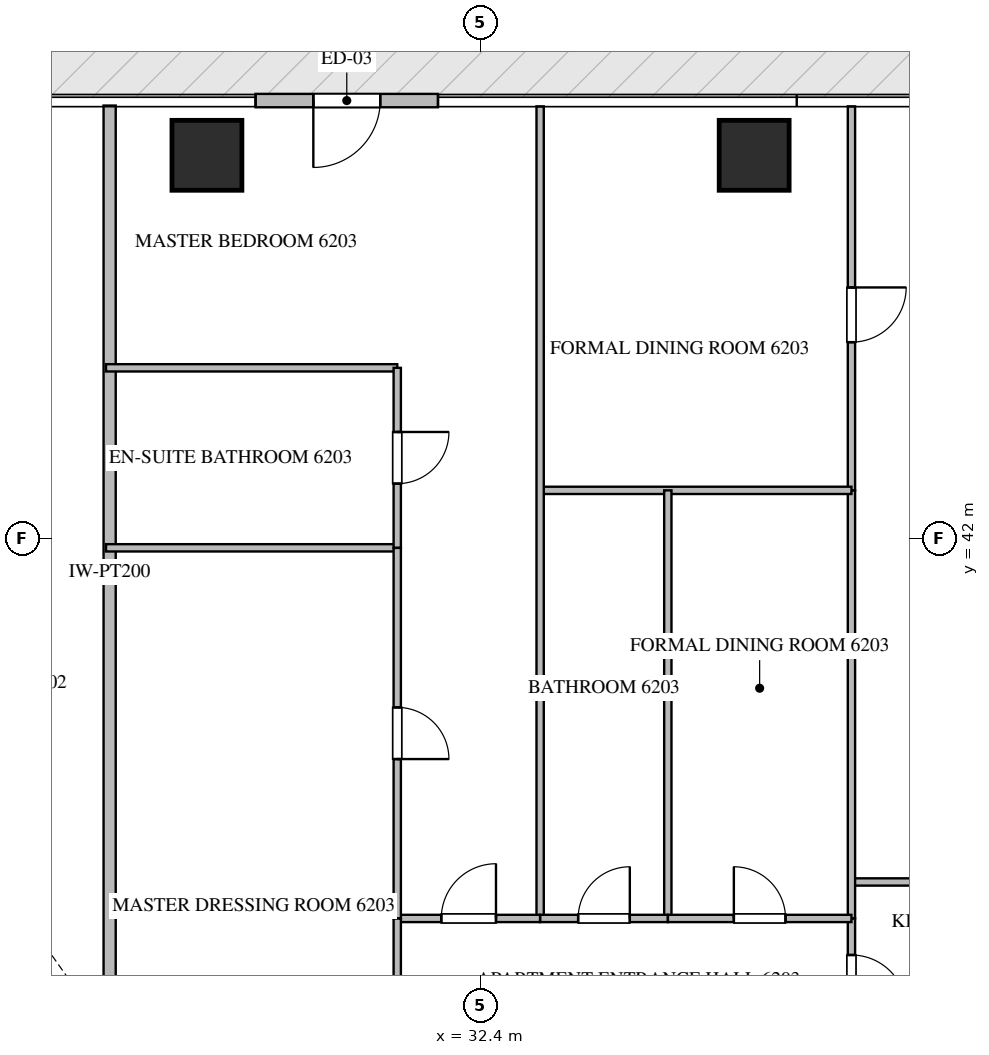
"""IFC4 building model, lengths in metres.
Left out: names, types, materials, properties, quantities, classifications, styles, units other than length and angle.
Written with IfcOpenShell. Run it as: python <this file> out.ifc"""

import sys

from ifc_helpers import new_model, si_unit, direction, frame, frame_2d, origin, origin_2d, place, context, subcontext, project, spatial, rectangle, extrude, source, transform, mapped, element, fill, save


model = new_model("IFC4")
c1 = context("Model", 3, precision=1e-05, world=origin(), true_north=direction((0.0, 1.0)))
c2 = subcontext(c1, "Body", "Model", "MODEL_VIEW")
j1 = project(units=[si_unit("LENGTHUNIT", "METRE"), si_unit("PLANEANGLEUNIT", "RADIAN")], contexts=[c1])
p1 = place(None, origin())
s1 = spatial("IfcSite", under=j1, at=p1, CompositionType="ELEMENT")
p2 = place(p1, origin())
s2 = spatial("IfcBuilding", under=s1, at=p2, CompositionType="ELEMENT")
p3 = place(p2, frame((0.0, 0.0, 248.95)))
s3 = spatial("IfcBuildingStorey", under=s2, at=p3, CompositionType="ELEMENT", Elevation=248.95)
m1 = source(origin(), c2, "Body", "SweptSolid", [
    extrude(rectangle(XDim=1.15, YDim=1.15, at=origin_2d()), origin(), (0.0, 0.0, 1.0), 3.85),
])
for number, where, z_axis, x_axis in (
    (1, (27.9, 48.3, -0.26), (0.0, 0.0, 1.0), (1.0, 0.0, 0.0)),
    (2, (36.9, 48.3, -0.26), (0.0, 0.0, 1.0), (1.0, 0.0, 0.0)),
):
    element("IfcColumn", number, at=place(p3, frame(where, z_axis=z_axis, x_axis=x_axis)), inside=s3, PredefinedType="COLUMN", context=c2, shape_type="MappedRepresentation", body=[
        mapped(m1, transform((0.0, 0.0, 0.0), scale=1.0)),
    ])
p4 = place(p3, frame((31.7, 49.2, 0.0), z_axis=(0.0, 0.0, 1.0), x_axis=(-1.0, 0.0, 0.0)))
e3 = element("IfcWall", 3, at=p4, inside=s3, PredefinedType="ELEMENTEDWALL", context=c2, shape_type="SweptSolid", body=[
    extrude(rectangle(XDim=3.0, YDim=0.22, at=frame_2d((1.5, 0.0))), origin(), (0.0, 0.0, 1.0), 3.575),
])
p5 = place(p4, frame((0.95, 0.0, 0.0)))
e4 = element("IfcOpeningElement", 4, at=p5, cuts=e3, PredefinedType="OPENING", context=c2, shape_type="SweptSolid", body=[
    extrude(rectangle(XDim=1.1, YDim=2.2, at=frame_2d((0.55, 1.1))), frame((0.0, 0.12, 0.0), z_axis=(0.0, -1.0, 0.0), x_axis=(1.0, 0.0, 0.0)), (0.0, 0.0, 1.0), 0.24),
])
p6 = place(p3, frame((26.3, 33.775, 0.0), z_axis=(0.0, 0.0, 1.0), x_axis=(0.0, 1.0, 0.0)))
e5 = element("IfcWall", 5, at=p6, inside=s3, PredefinedType="PARTITIONING", context=c2, shape_type="SweptSolid", body=[
    extrude(rectangle(XDim=15.343, YDim=0.2, at=frame_2d((7.671, 0.0))), origin(), (0.0, 0.0, 1.0), 3.59),
])
p7 = place(p3, frame((38.5, 36.35, 0.0), z_axis=(0.0, 0.0, 1.0), x_axis=(1.0, 0.0, 0.0)))
e6 = element("IfcWall", 6, at=p7, inside=s3, PredefinedType="PARTITIONING", context=c2, shape_type="SweptSolid", body=[
    extrude(rectangle(XDim=2.85, YDim=0.12, at=frame_2d((1.425, 0.0))), origin(), (0.0, 0.0, 1.0), 3.59),
])
p8 = place(p7, frame((1.0, 0.0, 0.0)))
e7 = element("IfcOpeningElement", 7, at=p8, cuts=e6, PredefinedType="OPENING", context=c2, shape_type="SweptSolid", body=[
    extrude(rectangle(XDim=0.85, YDim=2.1, at=frame_2d((0.425, 1.05))), frame((0.0, 0.07, 0.0), z_axis=(0.0, -1.0, 0.0), x_axis=(1.0, 0.0, 0.0)), (0.0, 0.0, 1.0), 0.14),
])
p9 = place(p3, frame((38.5, 35.75, 0.0), z_axis=(0.0, 0.0, 1.0), x_axis=(0.0, -1.0, 0.0)))
e8 = element("IfcWall", 8, at=p9, inside=s3, PredefinedType="PARTITIONING", context=c2, shape_type="SweptSolid", body=[
    extrude(rectangle(XDim=1.975, YDim=0.12, at=frame_2d((0.988, 0.0))), origin(), (0.0, 0.0, 1.0), 3.59),
])
p10 = place(p9, frame((0.601, 0.0, 0.0)))
e9 = element("IfcOpeningElement", 9, at=p10, cuts=e8, PredefinedType="OPENING", context=c2, shape_type="SweptSolid", body=[
    extrude(rectangle(XDim=0.9, YDim=2.1, at=frame_2d((0.45, 1.05))), frame((0.0, 0.07, 0.0), z_axis=(0.0, -1.0, 0.0), x_axis=(1.0, 0.0, 0.0)), (0.0, 0.0, 1.0), 0.14),
])
p11 = place(p3, frame((38.5, 49.105, 0.0), z_axis=(0.0, 0.0, 1.0), x_axis=(0.0, -1.0, 0.0)))
e10 = element("IfcWall", 10, at=p11, inside=s3, PredefinedType="PARTITIONING", context=c2, shape_type="SweptSolid", body=[
    extrude(rectangle(XDim=6.315, YDim=0.12, at=frame_2d((3.157, 0.0))), origin(), (0.0, 0.0, 1.0), 3.59),
])
p12 = place(p11, frame((2.978, 0.0, 0.0)))
e11 = element("IfcOpeningElement", 11, at=p12, cuts=e10, PredefinedType="OPENING", context=c2, shape_type="SweptSolid", body=[
    extrude(rectangle(XDim=0.9, YDim=2.1, at=frame_2d((0.45, 1.05))), frame((0.0, 0.07, 0.0), z_axis=(0.0, -1.0, 0.0), x_axis=(1.0, 0.0, 0.0)), (0.0, 0.0, 1.0), 0.14),
])
p13 = place(p3, frame((38.5, 42.788, 0.0), z_axis=(0.0, 0.0, 1.0), x_axis=(0.0, -1.0, 0.0)))
e12 = element("IfcWall", 12, at=p13, inside=s3, PredefinedType="PARTITIONING", context=c2, shape_type="SweptSolid", body=[
    extrude(rectangle(XDim=7.036, YDim=0.12, at=frame_2d((3.518, 0.0))), origin(), (0.0, 0.0, 1.0), 3.59),
])
p14 = place(p3, frame((33.38, 42.79, 0.0), z_axis=(0.0, 0.0, 1.0), x_axis=(1.0, 0.0, 0.0)))
e13 = element("IfcWall", 13, at=p14, inside=s3, PredefinedType="PARTITIONING", context=c2, shape_type="SweptSolid", body=[
    extrude(rectangle(XDim=5.12, YDim=0.12, at=frame_2d((2.56, 0.0))), origin(), (0.0, 0.0, 1.0), 3.59),
])
p15 = place(p3, frame((33.38, 49.105, 0.0), z_axis=(0.0, 0.0, 1.0), x_axis=(0.0, -1.0, 0.0)))
e14 = element("IfcWall", 14, at=p15, inside=s3, PredefinedType="PARTITIONING", context=c2, shape_type="SweptSolid", body=[
    extrude(rectangle(XDim=13.355, YDim=0.12, at=frame_2d((6.677, 0.0))), origin(), (0.0, 0.0, 1.0), 3.59),
])
p16 = place(p3, frame((35.48, 42.79, 0.0), z_axis=(0.0, 0.0, 1.0), x_axis=(0.0, -1.0, 0.0)))
e15 = element("IfcWall", 15, at=p16, inside=s3, PredefinedType="PARTITIONING", context=c2, shape_type="SweptSolid", body=[
    extrude(rectangle(XDim=7.04, YDim=0.12, at=frame_2d((3.52, 0.0))), origin(), (0.0, 0.0, 1.0), 3.59),
])
p17 = place(p3, frame((33.38, 35.75, 0.0), z_axis=(0.0, 0.0, 1.0), x_axis=(1.0, 0.0, 0.0)))
e16 = element("IfcWall", 16, at=p17, inside=s3, PredefinedType="PARTITIONING", context=c2, shape_type="SweptSolid", body=[
    extrude(rectangle(XDim=2.1, YDim=0.12, at=frame_2d((1.05, 0.0))), origin(), (0.0, 0.0, 1.0), 3.59),
])
p18 = place(p17, frame((0.625, 0.0, 0.0)))
e17 = element("IfcOpeningElement", 17, at=p18, cuts=e16, PredefinedType="OPENING", context=c2, shape_type="SweptSolid", body=[
    extrude(rectangle(XDim=0.85, YDim=2.1, at=frame_2d((0.425, 1.05))), frame((0.0, 0.07, 0.0), z_axis=(0.0, -1.0, 0.0), x_axis=(1.0, 0.0, 0.0)), (0.0, 0.0, 1.0), 0.14),
])
p19 = place(p3, frame((35.482, 35.75, 0.0), z_axis=(0.0, 0.0, 1.0), x_axis=(1.0, 0.0, 0.0)))
e18 = element("IfcWall", 18, at=p19, inside=s3, PredefinedType="PARTITIONING", context=c2, shape_type="SweptSolid", body=[
    extrude(rectangle(XDim=3.018, YDim=0.12, at=frame_2d((1.509, 0.0))), origin(), (0.0, 0.0, 1.0), 3.59),
])
p20 = place(p19, frame((1.084, 0.0, 0.0)))
e19 = element("IfcOpeningElement", 19, at=p20, cuts=e18, PredefinedType="OPENING", context=c2, shape_type="SweptSolid", body=[
    extrude(rectangle(XDim=0.85, YDim=2.1, at=frame_2d((0.425, 1.05))), frame((0.0, 0.07, 0.0), z_axis=(0.0, -1.0, 0.0), x_axis=(1.0, 0.0, 0.0)), (0.0, 0.0, 1.0), 0.14),
])
p21 = place(p3, frame((31.03, 35.75, 0.0), z_axis=(0.0, 0.0, 1.0), x_axis=(1.0, 0.0, 0.0)))
e20 = element("IfcWall", 20, at=p21, inside=s3, PredefinedType="PARTITIONING", context=c2, shape_type="SweptSolid", body=[
    extrude(rectangle(XDim=2.348, YDim=0.12, at=frame_2d((1.174, 0.0))), origin(), (0.0, 0.0, 1.0), 3.59),
])
p22 = place(p21, frame((0.724, 0.0, 0.0)))
e21 = element("IfcOpeningElement", 21, at=p22, cuts=e20, PredefinedType="OPENING", context=c2, shape_type="SweptSolid", body=[
    extrude(rectangle(XDim=0.9, YDim=2.1, at=frame_2d((0.45, 1.05))), frame((0.0, 0.07, 0.0), z_axis=(0.0, -1.0, 0.0), x_axis=(1.0, 0.0, 0.0)), (0.0, 0.0, 1.0), 0.14),
])
for number, where, z_axis, x_axis in (
    (22, (26.24, 44.805, 0.0), (0.0, 0.0, 1.0), (1.0, 0.0, 0.0)),
    (23, (26.24, 41.845, 0.0), (0.0, 0.0, 1.0), (1.0, 0.0, 0.0)),
):
    element("IfcWall", number, at=place(p3, frame(where, z_axis=z_axis, x_axis=x_axis)), inside=s3, PredefinedType="PARTITIONING", context=c2, shape_type="SweptSolid", body=[
        extrude(rectangle(XDim=4.79, YDim=0.12, at=frame_2d((2.395, 0.0))), origin(), (0.0, 0.0, 1.0), 3.59),
    ])
p23 = place(p3, frame((31.03, 44.805, 0.0), z_axis=(0.0, 0.0, 1.0), x_axis=(0.0, -1.0, 0.0)))
e24 = element("IfcWall", 24, at=p23, inside=s3, PredefinedType="PARTITIONING", context=c2, shape_type="SweptSolid", body=[
    extrude(rectangle(XDim=2.96, YDim=0.12, at=frame_2d((1.48, 0.0))), origin(), (0.0, 0.0, 1.0), 3.59),
])
p24 = place(p23, frame((1.055, 0.0, 0.0)))
e25 = element("IfcOpeningElement", 25, at=p24, cuts=e24, PredefinedType="OPENING", context=c2, shape_type="SweptSolid", body=[
    extrude(rectangle(XDim=0.85, YDim=2.1, at=frame_2d((0.425, 1.05))), frame((0.0, 0.07, 0.0), z_axis=(0.0, -1.0, 0.0), x_axis=(1.0, 0.0, 0.0)), (0.0, 0.0, 1.0), 0.14),
])
p25 = place(p3, frame((31.03, 41.843, 0.0), z_axis=(0.0, 0.0, 1.0), x_axis=(0.0, -1.0, 0.0)))
e26 = element("IfcWall", 26, at=p25, inside=s3, PredefinedType="PARTITIONING", context=c2, shape_type="SweptSolid", body=[
    extrude(rectangle(XDim=6.093, YDim=0.12, at=frame_2d((3.046, 0.0))), origin(), (0.0, 0.0, 1.0), 3.59),
])
p26 = place(p25, frame((2.622, 0.0, 0.0)))
e27 = element("IfcOpeningElement", 27, at=p26, cuts=e26, PredefinedType="OPENING", context=c2, shape_type="SweptSolid", body=[
    extrude(rectangle(XDim=0.85, YDim=2.1, at=frame_2d((0.425, 1.05))), frame((0.0, 0.07, 0.0), z_axis=(0.0, -1.0, 0.0), x_axis=(1.0, 0.0, 0.0)), (0.0, 0.0, 1.0), 0.14),
])
p27 = place(p3, frame((31.03, 35.748, 0.0), z_axis=(0.0, 0.0, 1.0), x_axis=(0.0, -1.0, 0.0)))
e28 = element("IfcWall", 28, at=p27, inside=s3, PredefinedType="PARTITIONING", context=c2, shape_type="SweptSolid", body=[
    extrude(rectangle(XDim=1.973, YDim=0.12, at=frame_2d((0.987, 0.0))), origin(), (0.0, 0.0, 1.0), 3.59),
])
m2 = source(origin(), c2, "Body", "SweptSolid", [
    extrude(rectangle(XDim=1.1, YDim=2.2, at=frame_2d((0.55, 1.1))), frame((0.0, 0.025, 0.0), z_axis=(0.0, -1.0, 0.0), x_axis=(1.0, 0.0, 0.0)), (0.0, 0.0, 1.0), 0.05),
])
p28 = place(p5, origin())
e29 = element("IfcDoor", 29, at=p28, inside=s3, OperationType="SINGLE_SWING_RIGHT", PredefinedType="DOOR", context=c2, shape_type="MappedRepresentation", body=[
    mapped(m2, transform((0.0, 0.0, 0.0), scale=1.0)),
])
fill(e4, e29)
m3 = source(origin(), c2, "Body", "SweptSolid", [
    extrude(rectangle(XDim=0.9, YDim=2.1, at=frame_2d((0.45, 1.05))), frame((0.0, 0.025, 0.0), z_axis=(0.0, -1.0, 0.0), x_axis=(1.0, 0.0, 0.0)), (0.0, 0.0, 1.0), 0.05),
])
p29 = place(p10, origin())
e30 = element("IfcDoor", 30, at=p29, inside=s3, OperationType="SINGLE_SWING_RIGHT", PredefinedType="DOOR", context=c2, shape_type="MappedRepresentation", body=[
    mapped(m3, transform((0.0, 0.0, 0.0), scale=1.0)),
])
fill(e9, e30)
p30 = place(p12, origin())
e31 = element("IfcDoor", 31, at=p30, inside=s3, OperationType="SINGLE_SWING_LEFT", PredefinedType="DOOR", context=c2, shape_type="MappedRepresentation", body=[
    mapped(m3, transform((0.0, 0.0, 0.0), scale=1.0)),
])
fill(e11, e31)
m4 = source(origin(), c2, "Body", "SweptSolid", [
    extrude(rectangle(XDim=0.85, YDim=2.1, at=frame_2d((0.425, 1.05))), frame((0.0, 0.025, 0.0), z_axis=(0.0, -1.0, 0.0), x_axis=(1.0, 0.0, 0.0)), (0.0, 0.0, 1.0), 0.05),
])
p31 = place(p18, origin())
e32 = element("IfcDoor", 32, at=p31, inside=s3, OperationType="SINGLE_SWING_RIGHT", PredefinedType="DOOR", context=c2, shape_type="MappedRepresentation", body=[
    mapped(m4, transform((0.0, 0.0, 0.0), scale=1.0)),
])
fill(e17, e32)
p32 = place(p20, origin())
e33 = element("IfcDoor", 33, at=p32, inside=s3, OperationType="SINGLE_SWING_LEFT", PredefinedType="DOOR", context=c2, shape_type="MappedRepresentation", body=[
    mapped(m4, transform((0.0, 0.0, 0.0), scale=1.0)),
])
fill(e19, e33)
p33 = place(p22, origin())
e34 = element("IfcDoor", 34, at=p33, inside=s3, OperationType="SINGLE_SWING_RIGHT", PredefinedType="DOOR", context=c2, shape_type="MappedRepresentation", body=[
    mapped(m3, transform((0.0, 0.0, 0.0), scale=1.0)),
])
fill(e21, e34)
p34 = place(p24, origin())
e35 = element("IfcDoor", 35, at=p34, inside=s3, OperationType="SINGLE_SWING_LEFT", PredefinedType="DOOR", context=c2, shape_type="MappedRepresentation", body=[
    mapped(m4, transform((0.0, 0.0, 0.0), scale=1.0)),
])
fill(e25, e35)
p35 = place(p26, origin())
e36 = element("IfcDoor", 36, at=p35, inside=s3, OperationType="SINGLE_SWING_RIGHT", PredefinedType="DOOR", context=c2, shape_type="MappedRepresentation", body=[
    mapped(m4, transform((0.0, 0.0, 0.0), scale=1.0)),
])
fill(e27, e36)
save(model, sys.argv[1])
